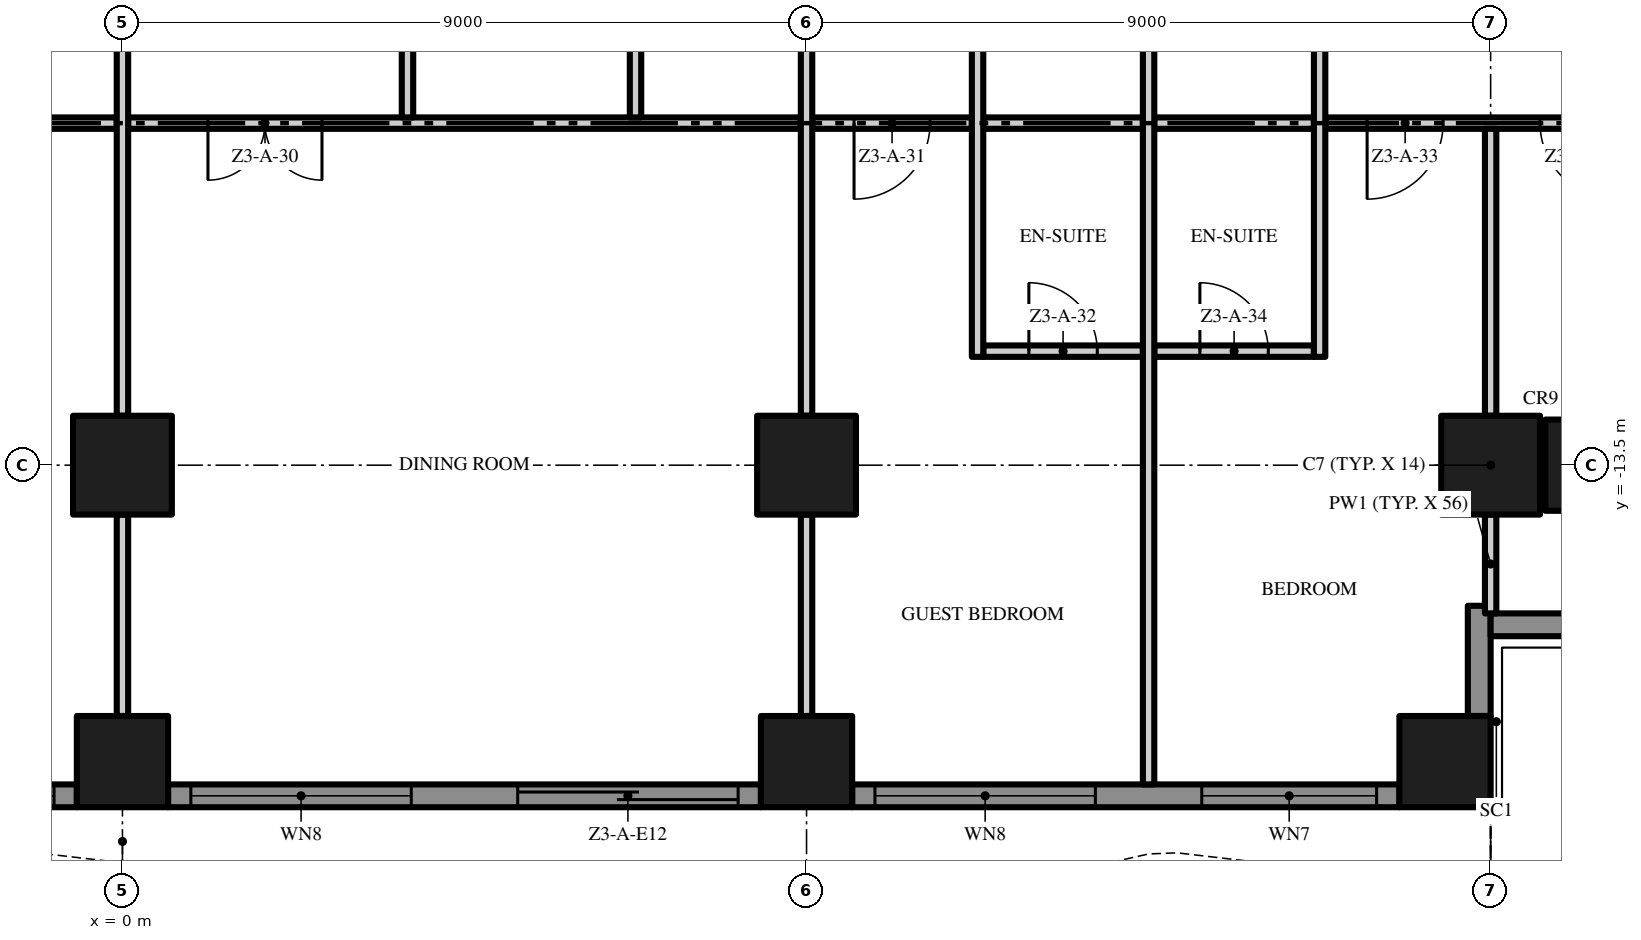
"""IFC4 building model, lengths in metres.
Left out: names, types, materials, properties, quantities, classifications, styles, units other than length and angle.
Written with IfcOpenShell. Run it as: python <this file> out.ifc"""

import sys

from ifc_helpers import new_model, si_unit, direction, frame, frame_2d, origin, origin_2d, place, context, subcontext, project, spatial, polyline, rectangle, outline, extrude, element, fill, save


model = new_model("IFC4")
c1 = context("Model", 3, precision=1e-05, world=origin(), true_north=direction((0.0, 1.0)))
c2 = subcontext(c1, "Body", "Model", "MODEL_VIEW")
j1 = project(units=[si_unit("LENGTHUNIT", "METRE"), si_unit("PLANEANGLEUNIT", "RADIAN")], contexts=[c1])
p1 = place(None, origin())
s1 = spatial("IfcSite", under=j1, at=p1, CompositionType="ELEMENT")
p2 = place(p1, origin())
s2 = spatial("IfcBuilding", under=s1, at=p2, CompositionType="ELEMENT")
p3 = place(p2, frame((0.0, 0.0, 132.6)))
s3 = spatial("IfcBuildingStorey", under=s2, at=p3, CompositionType="ELEMENT", Elevation=132.6)
p4 = place(p3, frame((0.0, -13.5, 0.0), z_axis=(0.0, 0.0, 1.0), x_axis=(1.0, 0.0, 0.0)))
e1 = element("IfcColumn", 1, at=p4, inside=s3, PredefinedType="COLUMN", context=c2, shape_type="SweptSolid", body=[
    extrude(rectangle(XDim=1.3, YDim=1.3, at=origin_2d()), origin(), (0.0, 0.0, 1.0), 3.5),
])
p5 = place(p3, frame((0.0, -17.4, 0.0), z_axis=(0.0, 0.0, 1.0), x_axis=(1.0, 0.0, 0.0)))
e2 = element("IfcColumn", 2, at=p5, inside=s3, PredefinedType="COLUMN", context=c2, shape_type="SweptSolid", body=[
    extrude(rectangle(XDim=1.2, YDim=1.2, at=origin_2d()), origin(), (0.0, 0.0, 1.0), 3.5),
])
p6 = place(p3, frame((18.0, -13.5, 0.0), z_axis=(0.0, 0.0, 1.0), x_axis=(1.0, 0.0, 0.0)))
e3 = element("IfcColumn", 3, at=p6, inside=s3, PredefinedType="COLUMN", context=c2, shape_type="SweptSolid", body=[
    extrude(rectangle(XDim=1.3, YDim=1.3, at=origin_2d()), origin(), (0.0, 0.0, 1.0), 3.5),
])
for number, where, z_axis, x_axis in (
    (4, (17.4, -17.4, 0.0), (0.0, 0.0, 1.0), (1.0, 0.0, 0.0)),
    (5, (19.32, -13.5, 0.0), (0.0, 0.0, 1.0), (1.0, 0.0, 0.0)),
):
    element("IfcColumn", number, at=place(p3, frame(where, z_axis=z_axis, x_axis=x_axis)), inside=s3, PredefinedType="COLUMN", context=c2, shape_type="SweptSolid", body=[
        extrude(rectangle(XDim=1.2, YDim=1.2, at=origin_2d()), origin(), (0.0, 0.0, 1.0), 3.5),
    ])
p7 = place(p3, frame((9.0, -13.5, 0.0), z_axis=(0.0, 0.0, 1.0), x_axis=(1.0, 0.0, 0.0)))
e6 = element("IfcColumn", 6, at=p7, inside=s3, PredefinedType="COLUMN", context=c2, shape_type="SweptSolid", body=[
    extrude(rectangle(XDim=1.3, YDim=1.3, at=origin_2d()), origin(), (0.0, 0.0, 1.0), 3.5),
])
p8 = place(p3, frame((9.0, -17.4, 0.0), z_axis=(0.0, 0.0, 1.0), x_axis=(1.0, 0.0, 0.0)))
e7 = element("IfcColumn", 7, at=p8, inside=s3, PredefinedType="COLUMN", context=c2, shape_type="SweptSolid", body=[
    extrude(rectangle(XDim=1.2, YDim=1.2, at=origin_2d()), origin(), (0.0, 0.0, 1.0), 3.5),
])
p9 = place(p3, frame((-0.6, -17.85, 0.0), z_axis=(0.0, 0.0, 1.0), x_axis=(-1.0, 0.0, 0.0)))
e8 = element("IfcWall", 8, at=p9, inside=s3, PredefinedType="SOLIDWALL", context=c2, shape_type="SweptSolid", body=[
    extrude(rectangle(XDim=7.8, YDim=0.3, at=frame_2d((3.9, 0.0))), origin(), (0.0, 0.0, 1.0), 3.5),
])
p10 = place(p9, frame((4.6, 0.0, 0.0)))
e9 = element("IfcOpeningElement", 9, at=p10, cuts=e8, PredefinedType="OPENING", context=c2, shape_type="SweptSolid", body=[
    extrude(rectangle(XDim=2.9, YDim=2.4, at=frame_2d((1.45, 1.2))), frame((0.0, 0.16, 0.0), z_axis=(0.0, -1.0, 0.0), x_axis=(1.0, 0.0, 0.0)), (0.0, 0.0, 1.0), 0.32),
])
p11 = place(p9, frame((0.3, 0.0, 0.45)))
e10 = element("IfcOpeningElement", 10, at=p11, cuts=e8, PredefinedType="OPENING", context=c2, shape_type="SweptSolid", body=[
    extrude(rectangle(XDim=2.9, YDim=2.65, at=frame_2d((1.45, 1.325))), frame((0.0, 0.16, 0.0), z_axis=(0.0, -1.0, 0.0), x_axis=(1.0, 0.0, 0.0)), (0.0, 0.0, 1.0), 0.32),
])
p12 = place(p3, frame((8.4, -17.85, 0.0), z_axis=(0.0, 0.0, 1.0), x_axis=(-1.0, 0.0, 0.0)))
e11 = element("IfcWall", 11, at=p12, inside=s3, PredefinedType="SOLIDWALL", context=c2, shape_type="SweptSolid", body=[
    extrude(rectangle(XDim=7.8, YDim=0.3, at=frame_2d((3.9, 0.0))), origin(), (0.0, 0.0, 1.0), 3.5),
])
p13 = place(p12, frame((4.6, 0.0, 0.45)))
e12 = element("IfcOpeningElement", 12, at=p13, cuts=e11, PredefinedType="OPENING", context=c2, shape_type="SweptSolid", body=[
    extrude(rectangle(XDim=2.9, YDim=2.65, at=frame_2d((1.45, 1.325))), frame((0.0, 0.16, 0.0), z_axis=(0.0, -1.0, 0.0), x_axis=(1.0, 0.0, 0.0)), (0.0, 0.0, 1.0), 0.32),
])
p14 = place(p12, frame((0.3, 0.0, 0.0)))
e13 = element("IfcOpeningElement", 13, at=p14, cuts=e11, PredefinedType="OPENING", context=c2, shape_type="SweptSolid", body=[
    extrude(rectangle(XDim=2.9, YDim=2.4, at=frame_2d((1.45, 1.2))), frame((0.0, 0.16, 0.0), z_axis=(0.0, -1.0, 0.0), x_axis=(1.0, 0.0, 0.0)), (0.0, 0.0, 1.0), 0.32),
])
p15 = place(p3, frame((16.8, -17.85, 0.0), z_axis=(0.0, 0.0, 1.0), x_axis=(-1.0, 0.0, 0.0)))
e14 = element("IfcWall", 14, at=p15, inside=s3, PredefinedType="SOLIDWALL", context=c2, shape_type="SweptSolid", body=[
    extrude(rectangle(XDim=7.2, YDim=0.3, at=frame_2d((3.6, 0.0))), origin(), (0.0, 0.0, 1.0), 3.5),
])
p16 = place(p15, frame((4.0, 0.0, 0.45)))
e15 = element("IfcOpeningElement", 15, at=p16, cuts=e14, PredefinedType="OPENING", context=c2, shape_type="SweptSolid", body=[
    extrude(rectangle(XDim=2.9, YDim=2.65, at=frame_2d((1.45, 1.325))), frame((0.0, 0.16, 0.0), z_axis=(0.0, -1.0, 0.0), x_axis=(1.0, 0.0, 0.0)), (0.0, 0.0, 1.0), 0.32),
])
p17 = place(p15, frame((0.3, 0.0, 0.45)))
e16 = element("IfcOpeningElement", 16, at=p17, cuts=e14, PredefinedType="OPENING", context=c2, shape_type="SweptSolid", body=[
    extrude(rectangle(XDim=2.3, YDim=2.65, at=frame_2d((1.15, 1.325))), frame((0.0, 0.16, 0.0), z_axis=(0.0, -1.0, 0.0), x_axis=(1.0, 0.0, 0.0)), (0.0, 0.0, 1.0), 0.32),
])
p18 = place(p3, frame((17.85, -15.35, 0.0), z_axis=(0.0, 0.0, 1.0), x_axis=(0.0, -1.0, 0.0)))
e17 = element("IfcWall", 17, at=p18, inside=s3, PredefinedType="SOLIDWALL", context=c2, shape_type="SweptSolid", body=[
    extrude(rectangle(XDim=1.45, YDim=0.3, at=frame_2d((0.725, 0.0))), origin(), (0.0, 0.0, 1.0), 3.5),
])
p19 = place(p3, frame((20.25, -15.6, 0.0), z_axis=(0.0, 0.0, 1.0), x_axis=(-1.0, 0.0, 0.0)))
e18 = element("IfcWall", 18, at=p19, inside=s3, PredefinedType="SOLIDWALL", context=c2, shape_type="SweptSolid", body=[
    extrude(rectangle(XDim=2.25, YDim=0.3, at=frame_2d((1.125, 0.0))), origin(), (0.0, 0.0, 1.0), 3.5),
])
p20 = place(p3, origin())
e19 = element("IfcWall", 19, at=p20, inside=s3, PredefinedType="USERDEFINED", context=c2, shape_type="SweptSolid", body=[
    extrude(outline(polyline([(-18.0, -18.951), (-16.5, -18.615), (-16.125, -18.6), (-15.0, -18.731), (-13.5, -19.255), (-12.0, -19.988), (-10.5, -20.649), (-9.0, -20.985), (-8.625, -21.0), (-7.5, -20.869), (-6.0, -20.345), (-4.5, -19.612), (-3.0, -18.951), (-1.5, -18.615), (-1.125, -18.6), (0.0, -18.731), (1.5, -19.255), (3.0, -19.988), (4.5, -20.649), (6.0, -20.985), (6.375, -21.0), (7.5, -20.869), (9.0, -20.345), (10.5, -19.612), (12.0, -18.951), (13.5, -18.615), (13.875, -18.6), (15.0, -18.731), (16.5, -19.255), (18.0, -19.988), (18.11, -19.763), (16.596, -19.024), (15.056, -18.486), (13.885, -18.349), (13.467, -18.366), (11.921, -18.713), (10.395, -19.385), (8.904, -20.114), (7.444, -20.624), (6.365, -20.749), (6.033, -20.736), (4.579, -20.41), (3.105, -19.761), (1.596, -19.024), (0.056, -18.486), (-1.115, -18.349), (-1.533, -18.366), (-3.079, -18.713), (-4.605, -19.385), (-6.096, -20.114), (-7.556, -20.624), (-8.635, -20.749), (-8.967, -20.736), (-10.421, -20.41), (-11.895, -19.761), (-13.404, -19.024), (-14.944, -18.486), (-16.115, -18.349), (-16.533, -18.366), (-18.055, -18.708), (-18.0, -18.951)])), origin(), (0.0, 0.0, 1.0), 0.9),
])
p21 = place(p3, frame((11.325, -12.0, 0.0), z_axis=(0.0, 0.0, 1.0), x_axis=(1.0, 0.0, 0.0)))
e20 = element("IfcWall", 20, at=p21, inside=s3, PredefinedType="PARTITIONING", context=c2, shape_type="SweptSolid", body=[
    extrude(rectangle(XDim=2.1, YDim=0.15, at=frame_2d((1.05, 0.0))), origin(), (0.0, 0.0, 1.0), 3.5),
])
p22 = place(p21, frame((0.6, 0.0, 0.0)))
e21 = element("IfcOpeningElement", 21, at=p22, cuts=e20, PredefinedType="OPENING", context=c2, shape_type="SweptSolid", body=[
    extrude(rectangle(XDim=0.9, YDim=2.1, at=frame_2d((0.45, 1.05))), frame((0.0, 0.085, 0.0), z_axis=(0.0, -1.0, 0.0), x_axis=(1.0, 0.0, 0.0)), (0.0, 0.0, 1.0), 0.17),
])
p23 = place(p3, frame((13.575, -12.0, 0.0), z_axis=(0.0, 0.0, 1.0), x_axis=(1.0, 0.0, 0.0)))
e22 = element("IfcWall", 22, at=p23, inside=s3, PredefinedType="PARTITIONING", context=c2, shape_type="SweptSolid", body=[
    extrude(rectangle(XDim=2.1, YDim=0.15, at=frame_2d((1.05, 0.0))), origin(), (0.0, 0.0, 1.0), 3.5),
])
p24 = place(p23, frame((0.6, 0.0, 0.0)))
e23 = element("IfcOpeningElement", 23, at=p24, cuts=e22, PredefinedType="OPENING", context=c2, shape_type="SweptSolid", body=[
    extrude(rectangle(XDim=0.9, YDim=2.1, at=frame_2d((0.45, 1.05))), frame((0.0, 0.085, 0.0), z_axis=(0.0, -1.0, 0.0), x_axis=(1.0, 0.0, 0.0)), (0.0, 0.0, 1.0), 0.17),
])
p25 = place(p3, frame((-0.075, -9.0, 0.0), z_axis=(0.0, 0.0, 1.0), x_axis=(-1.0, 0.0, 0.0)))
e24 = element("IfcWall", 24, at=p25, inside=s3, PredefinedType="PARTITIONING", context=c2, shape_type="SweptSolid", body=[
    extrude(rectangle(XDim=6.6, YDim=0.15, at=frame_2d((3.3, 0.0))), origin(), (0.0, 0.0, 1.0), 3.5),
])
p26 = place(p25, frame((5.05, 0.0, 0.0)))
e25 = element("IfcOpeningElement", 25, at=p26, cuts=e24, PredefinedType="OPENING", context=c2, shape_type="SweptSolid", body=[
    extrude(rectangle(XDim=1.0, YDim=2.4, at=frame_2d((0.5, 1.2))), frame((0.0, 0.085, 0.0), z_axis=(0.0, -1.0, 0.0), x_axis=(1.0, 0.0, 0.0)), (0.0, 0.0, 1.0), 0.17),
])
p27 = place(p25, frame((2.825, 0.0, 0.0)))
e26 = element("IfcOpeningElement", 26, at=p27, cuts=e24, PredefinedType="OPENING", context=c2, shape_type="SweptSolid", body=[
    extrude(rectangle(XDim=1.0, YDim=2.4, at=frame_2d((0.5, 1.2))), frame((0.0, 0.085, 0.0), z_axis=(0.0, -1.0, 0.0), x_axis=(1.0, 0.0, 0.0)), (0.0, 0.0, 1.0), 0.17),
])
p28 = place(p3, frame((8.925, -9.0, 0.0), z_axis=(0.0, 0.0, 1.0), x_axis=(-1.0, 0.0, 0.0)))
e27 = element("IfcWall", 27, at=p28, inside=s3, PredefinedType="PARTITIONING", context=c2, shape_type="SweptSolid", body=[
    extrude(rectangle(XDim=8.85, YDim=0.15, at=frame_2d((4.425, 0.0))), origin(), (0.0, 0.0, 1.0), 3.5),
])
p29 = place(p28, frame((6.3, 0.0, 0.0)))
e28 = element("IfcOpeningElement", 28, at=p29, cuts=e27, PredefinedType="OPENING", context=c2, shape_type="SweptSolid", body=[
    extrude(rectangle(XDim=1.5, YDim=2.4, at=frame_2d((0.75, 1.2))), frame((0.0, 0.085, 0.0), z_axis=(0.0, -1.0, 0.0), x_axis=(1.0, 0.0, 0.0)), (0.0, 0.0, 1.0), 0.17),
])
p30 = place(p3, frame((11.175, -9.0, 0.0), z_axis=(0.0, 0.0, 1.0), x_axis=(-1.0, 0.0, 0.0)))
e29 = element("IfcWall", 29, at=p30, inside=s3, PredefinedType="PARTITIONING", context=c2, shape_type="SweptSolid", body=[
    extrude(rectangle(XDim=2.1, YDim=0.15, at=frame_2d((1.05, 0.0))), origin(), (0.0, 0.0, 1.0), 3.5),
])
p31 = place(p30, frame((0.55, 0.0, 0.0)))
e30 = element("IfcOpeningElement", 30, at=p31, cuts=e29, PredefinedType="OPENING", context=c2, shape_type="SweptSolid", body=[
    extrude(rectangle(XDim=1.0, YDim=2.4, at=frame_2d((0.5, 1.2))), frame((0.0, 0.085, 0.0), z_axis=(0.0, -1.0, 0.0), x_axis=(1.0, 0.0, 0.0)), (0.0, 0.0, 1.0), 0.17),
])
for number, where, z_axis, x_axis in (
    (31, (11.325, -9.0, 0.0), (0.0, 0.0, 1.0), (1.0, 0.0, 0.0)),
    (32, (13.575, -9.0, 0.0), (0.0, 0.0, 1.0), (1.0, 0.0, 0.0)),
):
    element("IfcWall", number, at=place(p3, frame(where, z_axis=z_axis, x_axis=x_axis)), inside=s3, PredefinedType="PARTITIONING", context=c2, shape_type="SweptSolid", body=[
        extrude(rectangle(XDim=2.1, YDim=0.15, at=frame_2d((1.05, 0.0))), origin(), (0.0, 0.0, 1.0), 3.5),
    ])
p32 = place(p3, frame((22.2, -9.0, 0.0), z_axis=(0.0, 0.0, 1.0), x_axis=(-1.0, 0.0, 0.0)))
e33 = element("IfcWall", 33, at=p32, inside=s3, PredefinedType="PARTITIONING", context=c2, shape_type="SweptSolid", body=[
    extrude(rectangle(XDim=6.375, YDim=0.15, at=frame_2d((3.188, 0.0))), origin(), (0.0, 0.0, 1.0), 3.5),
])
p33 = place(p32, frame((4.825, 0.0, 0.0)))
e34 = element("IfcOpeningElement", 34, at=p33, cuts=e33, PredefinedType="OPENING", context=c2, shape_type="SweptSolid", body=[
    extrude(rectangle(XDim=1.0, YDim=2.4, at=frame_2d((0.5, 1.2))), frame((0.0, 0.085, 0.0), z_axis=(0.0, -1.0, 0.0), x_axis=(1.0, 0.0, 0.0)), (0.0, 0.0, 1.0), 0.17),
])
p34 = place(p32, frame((2.55, 0.0, 0.0)))
e35 = element("IfcOpeningElement", 35, at=p34, cuts=e33, PredefinedType="OPENING", context=c2, shape_type="SweptSolid", body=[
    extrude(rectangle(XDim=1.0, YDim=2.4, at=frame_2d((0.5, 1.2))), frame((0.0, 0.085, 0.0), z_axis=(0.0, -1.0, 0.0), x_axis=(1.0, 0.0, 0.0)), (0.0, 0.0, 1.0), 0.17),
])
p35 = place(p3, frame((0.0, -16.8, 0.0), z_axis=(0.0, 0.0, 1.0), x_axis=(0.0, 1.0, 0.0)))
e36 = element("IfcWall", 36, at=p35, inside=s3, PredefinedType="PARTITIONING", context=c2, shape_type="SweptSolid", body=[
    extrude(rectangle(XDim=2.65, YDim=0.15, at=frame_2d((1.325, 0.0))), origin(), (0.0, 0.0, 1.0), 3.5),
])
p36 = place(p3, frame((0.0, -12.85, 0.0), z_axis=(0.0, 0.0, 1.0), x_axis=(0.0, 1.0, 0.0)))
e37 = element("IfcWall", 37, at=p36, inside=s3, PredefinedType="PARTITIONING", context=c2, shape_type="SweptSolid", body=[
    extrude(rectangle(XDim=7.7, YDim=0.15, at=frame_2d((3.85, 0.0))), origin(), (0.0, 0.0, 1.0), 3.5),
])
p37 = place(p3, frame((3.75, -8.925, 0.0), z_axis=(0.0, 0.0, 1.0), x_axis=(0.0, 1.0, 0.0)))
e38 = element("IfcWall", 38, at=p37, inside=s3, PredefinedType="PARTITIONING", context=c2, shape_type="SweptSolid", body=[
    extrude(rectangle(XDim=4.5, YDim=0.15, at=frame_2d((2.25, 0.0))), origin(), (0.0, 0.0, 1.0), 3.5),
])
p38 = place(p3, frame((6.75, -8.925, 0.0), z_axis=(0.0, 0.0, 1.0), x_axis=(0.0, 1.0, 0.0)))
e39 = element("IfcWall", 39, at=p38, inside=s3, PredefinedType="PARTITIONING", context=c2, shape_type="SweptSolid", body=[
    extrude(rectangle(XDim=4.35, YDim=0.15, at=frame_2d((2.175, 0.0))), origin(), (0.0, 0.0, 1.0), 3.5),
])
p39 = place(p3, frame((9.0, -16.8, 0.0), z_axis=(0.0, 0.0, 1.0), x_axis=(0.0, 1.0, 0.0)))
e40 = element("IfcWall", 40, at=p39, inside=s3, PredefinedType="PARTITIONING", context=c2, shape_type="SweptSolid", body=[
    extrude(rectangle(XDim=2.65, YDim=0.15, at=frame_2d((1.325, 0.0))), origin(), (0.0, 0.0, 1.0), 3.5),
])
p40 = place(p3, frame((9.0, -12.85, 0.0), z_axis=(0.0, 0.0, 1.0), x_axis=(0.0, 1.0, 0.0)))
e41 = element("IfcWall", 41, at=p40, inside=s3, PredefinedType="PARTITIONING", context=c2, shape_type="SweptSolid", body=[
    extrude(rectangle(XDim=7.7, YDim=0.15, at=frame_2d((3.85, 0.0))), origin(), (0.0, 0.0, 1.0), 3.5),
])
p41 = place(p3, frame((11.25, -12.075, 0.0), z_axis=(0.0, 0.0, 1.0), x_axis=(0.0, 1.0, 0.0)))
e42 = element("IfcWall", 42, at=p41, inside=s3, PredefinedType="PARTITIONING", context=c2, shape_type="SweptSolid", body=[
    extrude(rectangle(XDim=7.65, YDim=0.15, at=frame_2d((3.825, 0.0))), origin(), (0.0, 0.0, 1.0), 3.5),
])
p42 = place(p3, frame((13.5, -17.7, 0.0), z_axis=(0.0, 0.0, 1.0), x_axis=(0.0, 1.0, 0.0)))
e43 = element("IfcWall", 43, at=p42, inside=s3, PredefinedType="PARTITIONING", context=c2, shape_type="SweptSolid", body=[
    extrude(rectangle(XDim=13.125, YDim=0.15, at=frame_2d((6.562, 0.0))), origin(), (0.0, 0.0, 1.0), 3.5),
])
p43 = place(p3, frame((15.75, -12.075, 0.0), z_axis=(0.0, 0.0, 1.0), x_axis=(0.0, 1.0, 0.0)))
e44 = element("IfcWall", 44, at=p43, inside=s3, PredefinedType="PARTITIONING", context=c2, shape_type="SweptSolid", body=[
    extrude(rectangle(XDim=7.65, YDim=0.15, at=frame_2d((3.825, 0.0))), origin(), (0.0, 0.0, 1.0), 3.5),
])
p44 = place(p3, frame((18.0, -15.45, 0.0), z_axis=(0.0, 0.0, 1.0), x_axis=(0.0, 1.0, 0.0)))
e45 = element("IfcWall", 45, at=p44, inside=s3, PredefinedType="PARTITIONING", context=c2, shape_type="SweptSolid", body=[
    extrude(rectangle(XDim=1.3, YDim=0.15, at=frame_2d((0.65, 0.0))), origin(), (0.0, 0.0, 1.0), 3.5),
])
p45 = place(p3, frame((18.0, -12.85, 0.0), z_axis=(0.0, 0.0, 1.0), x_axis=(0.0, 1.0, 0.0)))
e46 = element("IfcWall", 46, at=p45, inside=s3, PredefinedType="PARTITIONING", context=c2, shape_type="SweptSolid", body=[
    extrude(rectangle(XDim=3.775, YDim=0.15, at=frame_2d((1.887, 0.0))), origin(), (0.0, 0.0, 1.0), 3.5),
])
p46 = place(p11, origin())
e47 = element("IfcWindow", 47, at=p46, inside=s3, PartitioningType="SINGLE_PANEL", PredefinedType="WINDOW", context=c2, shape_type="SweptSolid", body=[
    extrude(rectangle(XDim=2.9, YDim=2.65, at=frame_2d((1.45, 1.325))), frame((0.0, 0.03, 0.0), z_axis=(0.0, -1.0, 0.0), x_axis=(1.0, 0.0, 0.0)), (0.0, 0.0, 1.0), 0.06),
])
fill(e10, e47)
p47 = place(p13, origin())
e48 = element("IfcWindow", 48, at=p47, inside=s3, PartitioningType="SINGLE_PANEL", PredefinedType="WINDOW", context=c2, shape_type="SweptSolid", body=[
    extrude(rectangle(XDim=2.9, YDim=2.65, at=frame_2d((1.45, 1.325))), frame((0.0, 0.03, 0.0), z_axis=(0.0, -1.0, 0.0), x_axis=(1.0, 0.0, 0.0)), (0.0, 0.0, 1.0), 0.06),
])
fill(e12, e48)
p48 = place(p14, origin())
e49 = element("IfcDoor", 49, at=p48, inside=s3, OperationType="SINGLE_SWING_LEFT", PredefinedType="DOOR", context=c2, shape_type="SweptSolid", body=[
    extrude(rectangle(XDim=2.9, YDim=2.4, at=frame_2d((1.45, 1.2))), frame((0.0, 0.025, 0.0), z_axis=(0.0, -1.0, 0.0), x_axis=(1.0, 0.0, 0.0)), (0.0, 0.0, 1.0), 0.05),
])
fill(e13, e49)
p49 = place(p16, origin())
e50 = element("IfcWindow", 50, at=p49, inside=s3, PartitioningType="SINGLE_PANEL", PredefinedType="WINDOW", context=c2, shape_type="SweptSolid", body=[
    extrude(rectangle(XDim=2.9, YDim=2.65, at=frame_2d((1.45, 1.325))), frame((0.0, 0.03, 0.0), z_axis=(0.0, -1.0, 0.0), x_axis=(1.0, 0.0, 0.0)), (0.0, 0.0, 1.0), 0.06),
])
fill(e15, e50)
p50 = place(p17, origin())
e51 = element("IfcWindow", 51, at=p50, inside=s3, PartitioningType="SINGLE_PANEL", PredefinedType="WINDOW", context=c2, shape_type="SweptSolid", body=[
    extrude(rectangle(XDim=2.3, YDim=2.65, at=frame_2d((1.15, 1.325))), frame((0.0, 0.03, 0.0), z_axis=(0.0, -1.0, 0.0), x_axis=(1.0, 0.0, 0.0)), (0.0, 0.0, 1.0), 0.06),
])
fill(e16, e51)
p51 = place(p29, origin())
e52 = element("IfcDoor", 52, at=p51, inside=s3, OperationType="DOUBLE_DOOR_SINGLE_SWING", PredefinedType="DOOR", context=c2, shape_type="SweptSolid", body=[
    extrude(rectangle(XDim=1.5, YDim=2.4, at=frame_2d((0.75, 1.2))), frame((0.0, 0.025, 0.0), z_axis=(0.0, -1.0, 0.0), x_axis=(1.0, 0.0, 0.0)), (0.0, 0.0, 1.0), 0.05),
])
fill(e28, e52)
p52 = place(p31, origin())
e53 = element("IfcDoor", 53, at=p52, inside=s3, OperationType="SINGLE_SWING_RIGHT", PredefinedType="DOOR", context=c2, shape_type="SweptSolid", body=[
    extrude(rectangle(XDim=1.0, YDim=2.4, at=frame_2d((0.5, 1.2))), frame((0.0, 0.025, 0.0), z_axis=(0.0, -1.0, 0.0), x_axis=(1.0, 0.0, 0.0)), (0.0, 0.0, 1.0), 0.05),
])
fill(e30, e53)
p53 = place(p22, origin())
e54 = element("IfcDoor", 54, at=p53, inside=s3, OperationType="SINGLE_SWING_LEFT", PredefinedType="DOOR", context=c2, shape_type="SweptSolid", body=[
    extrude(rectangle(XDim=0.9, YDim=2.1, at=frame_2d((0.45, 1.05))), frame((0.0, 0.025, 0.0), z_axis=(0.0, -1.0, 0.0), x_axis=(1.0, 0.0, 0.0)), (0.0, 0.0, 1.0), 0.05),
])
fill(e21, e54)
p54 = place(p33, origin())
e55 = element("IfcDoor", 55, at=p54, inside=s3, OperationType="SINGLE_SWING_RIGHT", PredefinedType="DOOR", context=c2, shape_type="SweptSolid", body=[
    extrude(rectangle(XDim=1.0, YDim=2.4, at=frame_2d((0.5, 1.2))), frame((0.0, 0.025, 0.0), z_axis=(0.0, -1.0, 0.0), x_axis=(1.0, 0.0, 0.0)), (0.0, 0.0, 1.0), 0.05),
])
fill(e34, e55)
p55 = place(p24, origin())
e56 = element("IfcDoor", 56, at=p55, inside=s3, OperationType="SINGLE_SWING_LEFT", PredefinedType="DOOR", context=c2, shape_type="SweptSolid", body=[
    extrude(rectangle(XDim=0.9, YDim=2.1, at=frame_2d((0.45, 1.05))), frame((0.0, 0.025, 0.0), z_axis=(0.0, -1.0, 0.0), x_axis=(1.0, 0.0, 0.0)), (0.0, 0.0, 1.0), 0.05),
])
fill(e23, e56)
p56 = place(p34, origin())
e57 = element("IfcDoor", 57, at=p56, inside=s3, OperationType="SINGLE_SWING_LEFT", PredefinedType="DOOR", context=c2, shape_type="SweptSolid", body=[
    extrude(rectangle(XDim=1.0, YDim=2.4, at=frame_2d((0.5, 1.2))), frame((0.0, 0.025, 0.0), z_axis=(0.0, -1.0, 0.0), x_axis=(1.0, 0.0, 0.0)), (0.0, 0.0, 1.0), 0.05),
])
fill(e35, e57)
save(model, sys.argv[1])
